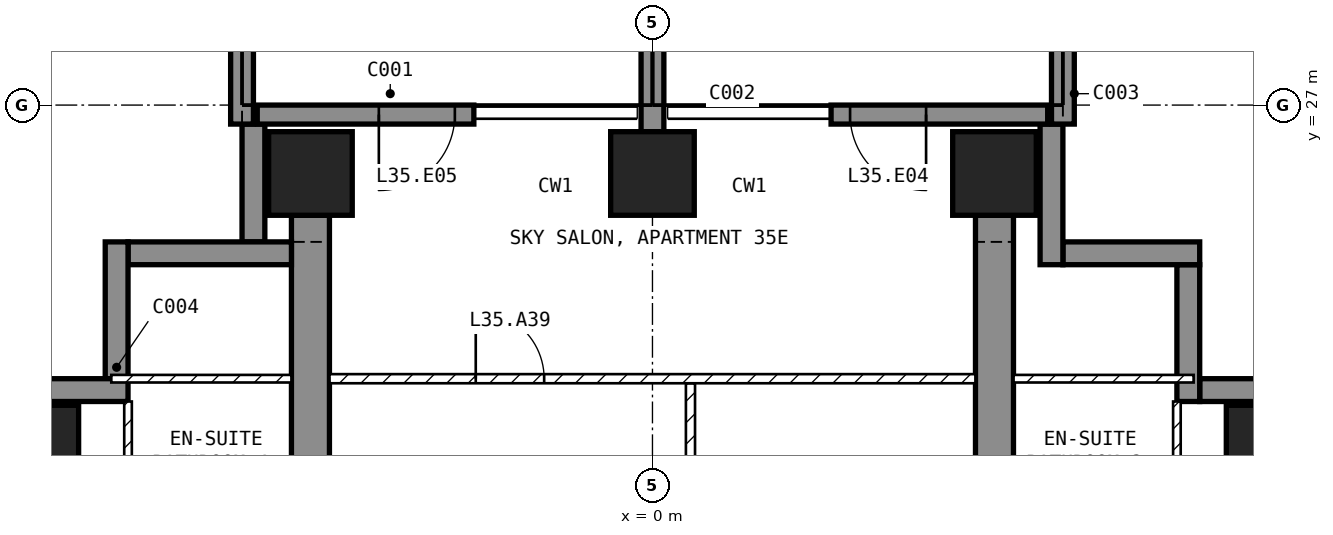
"""IFC4 building model, lengths in metres.
Left out: names, types, materials, properties, quantities, classifications, styles, units other than length and angle.
Written with IfcOpenShell. Run it as: python <this file> out.ifc"""

import sys

from ifc_helpers import new_model, si_unit, direction, frame, frame_2d, origin, origin_2d, place, context, subcontext, project, spatial, polyline, rectangle, outline, extrude, element, fill, save


model = new_model("IFC4")
c1 = context("Model", 3, precision=1e-05, world=origin(), true_north=direction((0.0, 1.0)))
c2 = subcontext(c1, "Body", "Model", "MODEL_VIEW")
j1 = project(units=[si_unit("LENGTHUNIT", "METRE"), si_unit("PLANEANGLEUNIT", "RADIAN")], contexts=[c1])
p1 = place(None, origin())
s1 = spatial("IfcSite", under=j1, at=p1, CompositionType="ELEMENT")
p2 = place(p1, origin())
s2 = spatial("IfcBuilding", under=s1, at=p2, CompositionType="ELEMENT")
p3 = place(p2, frame((0.0, 0.0, 144.4)))
s3 = spatial("IfcBuildingStorey", under=s2, at=p3, CompositionType="ELEMENT", Elevation=144.4)
for number, where, z_axis, x_axis in (
    (1, (-8.1, 22.5, -0.25), (0.0, 0.0, 1.0), (1.0, 0.0, 0.0)),
    (2, (-4.5, 26.1, -0.25), (0.0, 0.0, 1.0), (1.0, 0.0, 0.0)),
    (3, (0.0, 26.1, -0.25), (0.0, 0.0, 1.0), (1.0, 0.0, 0.0)),
    (4, (4.5, 26.1, -0.25), (0.0, 0.0, 1.0), (1.0, 0.0, 0.0)),
    (5, (8.1, 22.5, -0.25), (0.0, 0.0, 1.0), (1.0, 0.0, 0.0)),
):
    element("IfcColumn", number, at=place(p3, frame(where, z_axis=z_axis, x_axis=x_axis)), inside=s3, PredefinedType="COLUMN", context=c2, shape_type="SweptSolid", body=[
        extrude(rectangle(XDim=1.1, YDim=1.1, at=origin_2d()), origin(), (0.0, 0.0, 1.0), 3.5),
    ])
for number, where, z_axis, x_axis in (
    (6, (-4.75, 9.0, -0.25), (1.0, 0.0, 0.0), (0.0, 1.0, 0.0)),
    (7, (4.25, 9.0, -0.25), (1.0, 0.0, 0.0), (0.0, 1.0, 0.0)),
):
    element("IfcWall", number, at=place(p3, frame(where, z_axis=z_axis, x_axis=x_axis)), inside=s3, PredefinedType="SHEAR", context=c2, shape_type="SweptSolid", body=[
        extrude(outline(polyline([(0.0, 0.0), (2.1, 0.0), (2.1, 2.65), (4.5, 2.65), (4.5, 0.0), (9.9, 0.0), (9.9, 2.65), (12.3, 2.65), (12.3, 0.0), (16.55, 0.0), (16.55, 3.5), (0.0, 3.5), (0.0, 0.0)])), origin(), (0.0, 0.0, 1.0), 0.5),
    ])
p4 = place(p3, frame((5.2, 26.875, 0.0), z_axis=(0.0, 0.0, 1.0), x_axis=(-1.0, 0.0, 0.0)))
e8 = element("IfcWall", 8, at=p4, inside=s3, PredefinedType="SOLIDWALL", context=c2, shape_type="SweptSolid", body=[
    extrude(rectangle(XDim=2.85, YDim=0.25, at=frame_2d((1.425, 0.0))), origin(), (0.0, 0.0, 1.0), 3.25),
])
p5 = place(p4, frame((1.6, 0.0, 0.0)))
e9 = element("IfcOpeningElement", 9, at=p5, cuts=e8, PredefinedType="OPENING", context=c2, shape_type="SweptSolid", body=[
    extrude(rectangle(XDim=1.0, YDim=2.4, at=frame_2d((0.5, 1.2))), frame((0.0, 0.135, 0.0), z_axis=(0.0, -1.0, 0.0), x_axis=(1.0, 0.0, 0.0)), (0.0, 0.0, 1.0), 0.27),
])
p6 = place(p3, frame((-2.35, 26.875, 0.0), z_axis=(0.0, 0.0, 1.0), x_axis=(-1.0, 0.0, 0.0)))
e10 = element("IfcWall", 10, at=p6, inside=s3, PredefinedType="SOLIDWALL", context=c2, shape_type="SweptSolid", body=[
    extrude(rectangle(XDim=2.85, YDim=0.25, at=frame_2d((1.425, 0.0))), origin(), (0.0, 0.0, 1.0), 3.25),
])
p7 = place(p6, frame((0.25, 0.0, 0.0)))
e11 = element("IfcOpeningElement", 11, at=p7, cuts=e10, PredefinedType="OPENING", context=c2, shape_type="SweptSolid", body=[
    extrude(rectangle(XDim=1.0, YDim=2.4, at=frame_2d((0.5, 1.2))), frame((0.0, 0.135, 0.0), z_axis=(0.0, -1.0, 0.0), x_axis=(1.0, 0.0, 0.0)), (0.0, 0.0, 1.0), 0.27),
])
p8 = place(p3, frame((8.75, 23.25, 0.0), z_axis=(0.0, 0.0, 1.0), x_axis=(-1.0, 0.0, 0.0)))
e12 = element("IfcWall", 12, at=p8, inside=s3, PredefinedType="SOLIDWALL", context=c2, shape_type="SweptSolid", body=[
    extrude(rectangle(XDim=1.55, YDim=0.3, at=frame_2d((0.775, 0.0))), origin(), (0.0, 0.0, 1.0), 3.25),
])
p9 = place(p3, frame((7.05, 23.1, 0.0), z_axis=(0.0, 0.0, 1.0), x_axis=(0.0, 1.0, 0.0)))
e13 = element("IfcWall", 13, at=p9, inside=s3, PredefinedType="SOLIDWALL", context=c2, shape_type="SweptSolid", body=[
    extrude(rectangle(XDim=1.8, YDim=0.3, at=frame_2d((0.9, 0.0))), origin(), (0.0, 0.0, 1.0), 3.25),
])
p10 = place(p3, frame((7.2, 25.05, 0.0), z_axis=(0.0, 0.0, 1.0), x_axis=(-1.0, 0.0, 0.0)))
e14 = element("IfcWall", 14, at=p10, inside=s3, PredefinedType="SOLIDWALL", context=c2, shape_type="SweptSolid", body=[
    extrude(rectangle(XDim=1.8, YDim=0.3, at=frame_2d((0.9, 0.0))), origin(), (0.0, 0.0, 1.0), 3.25),
])
p11 = place(p3, frame((5.25, 24.9, 0.0), z_axis=(0.0, 0.0, 1.0), x_axis=(0.0, 1.0, 0.0)))
e15 = element("IfcWall", 15, at=p11, inside=s3, PredefinedType="SOLIDWALL", context=c2, shape_type="SweptSolid", body=[
    extrude(rectangle(XDim=1.85, YDim=0.3, at=frame_2d((0.925, 0.0))), origin(), (0.0, 0.0, 1.0), 3.25),
])
p12 = place(p3, frame((-5.25, 26.75, 0.0), z_axis=(0.0, 0.0, 1.0), x_axis=(0.0, -1.0, 0.0)))
e16 = element("IfcWall", 16, at=p12, inside=s3, PredefinedType="SOLIDWALL", context=c2, shape_type="SweptSolid", body=[
    extrude(rectangle(XDim=1.55, YDim=0.3, at=frame_2d((0.775, 0.0))), origin(), (0.0, 0.0, 1.0), 3.25),
])
p13 = place(p3, frame((-4.75, 25.05, 0.0), z_axis=(0.0, 0.0, 1.0), x_axis=(-1.0, 0.0, 0.0)))
e17 = element("IfcWall", 17, at=p13, inside=s3, PredefinedType="SOLIDWALL", context=c2, shape_type="SweptSolid", body=[
    extrude(rectangle(XDim=2.15, YDim=0.3, at=frame_2d((1.075, 0.0))), origin(), (0.0, 0.0, 1.0), 3.25),
])
p14 = place(p3, frame((-7.05, 25.2, 0.0), z_axis=(0.0, 0.0, 1.0), x_axis=(0.0, -1.0, 0.0)))
e18 = element("IfcWall", 18, at=p14, inside=s3, PredefinedType="SOLIDWALL", context=c2, shape_type="SweptSolid", body=[
    extrude(rectangle(XDim=1.8, YDim=0.3, at=frame_2d((0.9, 0.0))), origin(), (0.0, 0.0, 1.0), 3.25),
])
p15 = place(p3, frame((-6.9, 23.25, 0.0), z_axis=(0.0, 0.0, 1.0), x_axis=(-1.0, 0.0, 0.0)))
e19 = element("IfcWall", 19, at=p15, inside=s3, PredefinedType="SOLIDWALL", context=c2, shape_type="SweptSolid", body=[
    extrude(rectangle(XDim=1.85, YDim=0.3, at=frame_2d((0.925, 0.0))), origin(), (0.0, 0.0, 1.0), 3.25),
])
p16 = place(p3, frame((-5.4, 26.75, 0.0), z_axis=(0.0, 0.0, 1.0), x_axis=(0.0, 1.0, 0.0)))
e20 = element("IfcWall", 20, at=p16, inside=s3, PredefinedType="SOLIDWALL", context=c2, shape_type="SweptSolid", body=[
    extrude(rectangle(XDim=2.95, YDim=0.3, at=frame_2d((1.475, 0.0))), origin(), (0.0, 0.0, 1.0), 3.25),
])
p17 = place(p3, frame((0.0, 26.65, 0.0), z_axis=(0.0, 0.0, 1.0), x_axis=(0.0, 1.0, 0.0)))
e21 = element("IfcWall", 21, at=p17, inside=s3, PredefinedType="SOLIDWALL", context=c2, shape_type="SweptSolid", body=[
    extrude(rectangle(XDim=3.05, YDim=0.3, at=frame_2d((1.525, 0.0))), origin(), (0.0, 0.0, 1.0), 3.25),
])
p18 = place(p3, frame((5.4, 26.75, 0.0), z_axis=(0.0, 0.0, 1.0), x_axis=(0.0, 1.0, 0.0)))
e22 = element("IfcWall", 22, at=p18, inside=s3, PredefinedType="SOLIDWALL", context=c2, shape_type="SweptSolid", body=[
    extrude(rectangle(XDim=2.95, YDim=0.3, at=frame_2d((1.475, 0.0))), origin(), (0.0, 0.0, 1.0), 3.25),
])
p19 = place(p3, frame((0.5, 23.34, 0.0), z_axis=(0.0, 0.0, 1.0), x_axis=(0.0, -1.0, 0.0)))
e23 = element("IfcWall", 23, at=p19, inside=s3, PredefinedType="PARTITIONING", context=c2, shape_type="SweptSolid", body=[
    extrude(rectangle(XDim=4.38, YDim=0.12, at=frame_2d((2.19, 0.0))), origin(), (0.0, 0.0, 1.0), 3.25),
])
p20 = place(p19, frame((1.74, 0.0, 0.0)))
e24 = element("IfcOpeningElement", 24, at=p20, cuts=e23, PredefinedType="OPENING", context=c2, shape_type="SweptSolid", body=[
    extrude(rectangle(XDim=0.9, YDim=2.1, at=frame_2d((0.45, 1.05))), frame((0.0, 0.07, 0.0), z_axis=(0.0, -1.0, 0.0), x_axis=(1.0, 0.0, 0.0)), (0.0, 0.0, 1.0), 0.14),
])
p21 = place(p3, frame((-4.25, 23.4, 0.0), z_axis=(0.0, 0.0, 1.0), x_axis=(1.0, 0.0, 0.0)))
e25 = element("IfcWall", 25, at=p21, inside=s3, PredefinedType="PARTITIONING", context=c2, shape_type="SweptSolid", body=[
    extrude(rectangle(XDim=8.5, YDim=0.12, at=frame_2d((4.25, 0.0))), origin(), (0.0, 0.0, 1.0), 3.25),
])
p22 = place(p21, frame((1.925, 0.0, 0.0)))
e26 = element("IfcOpeningElement", 26, at=p22, cuts=e25, PredefinedType="OPENING", context=c2, shape_type="SweptSolid", body=[
    extrude(rectangle(XDim=0.9, YDim=2.1, at=frame_2d((0.45, 1.05))), frame((0.0, 0.07, 0.0), z_axis=(0.0, -1.0, 0.0), x_axis=(1.0, 0.0, 0.0)), (0.0, 0.0, 1.0), 0.14),
])
p23 = place(p3, frame((6.9, 20.45, 0.0), z_axis=(0.0, 0.0, 1.0), x_axis=(0.0, 1.0, 0.0)))
e27 = element("IfcWall", 27, at=p23, inside=s3, PredefinedType="PARTITIONING", context=c2, shape_type="SweptSolid", body=[
    extrude(rectangle(XDim=2.65, YDim=0.1, at=frame_2d((1.325, 0.0))), origin(), (0.0, 0.0, 1.0), 3.25),
])
p24 = place(p3, frame((4.75, 23.4, 0.0), z_axis=(0.0, 0.0, 1.0), x_axis=(1.0, 0.0, 0.0)))
e28 = element("IfcWall", 28, at=p24, inside=s3, PredefinedType="PARTITIONING", context=c2, shape_type="SweptSolid", body=[
    extrude(rectangle(XDim=2.37, YDim=0.1, at=frame_2d((1.185, 0.0))), origin(), (0.0, 0.0, 1.0), 3.25),
])
p25 = place(p3, frame((-6.9, 23.1, 0.0), z_axis=(0.0, 0.0, 1.0), x_axis=(0.0, -1.0, 0.0)))
e29 = element("IfcWall", 29, at=p25, inside=s3, PredefinedType="PARTITIONING", context=c2, shape_type="SweptSolid", body=[
    extrude(rectangle(XDim=2.65, YDim=0.1, at=frame_2d((1.325, 0.0))), origin(), (0.0, 0.0, 1.0), 3.25),
])
p26 = place(p3, frame((-7.12, 23.4, 0.0), z_axis=(0.0, 0.0, 1.0), x_axis=(1.0, 0.0, 0.0)))
e30 = element("IfcWall", 30, at=p26, inside=s3, PredefinedType="PARTITIONING", context=c2, shape_type="SweptSolid", body=[
    extrude(rectangle(XDim=2.37, YDim=0.1, at=frame_2d((1.185, 0.0))), origin(), (0.0, 0.0, 1.0), 3.25),
])
p27 = place(p5, origin())
e31 = element("IfcDoor", 31, at=p27, inside=s3, OperationType="SINGLE_SWING_LEFT", PredefinedType="DOOR", context=c2, shape_type="SweptSolid", body=[
    extrude(rectangle(XDim=1.0, YDim=2.4, at=frame_2d((0.5, 1.2))), frame((0.0, 0.025, 0.0), z_axis=(0.0, -1.0, 0.0), x_axis=(1.0, 0.0, 0.0)), (0.0, 0.0, 1.0), 0.05),
])
fill(e9, e31)
p28 = place(p7, origin())
e32 = element("IfcDoor", 32, at=p28, inside=s3, OperationType="SINGLE_SWING_RIGHT", PredefinedType="DOOR", context=c2, shape_type="SweptSolid", body=[
    extrude(rectangle(XDim=1.0, YDim=2.4, at=frame_2d((0.5, 1.2))), frame((0.0, 0.025, 0.0), z_axis=(0.0, -1.0, 0.0), x_axis=(1.0, 0.0, 0.0)), (0.0, 0.0, 1.0), 0.05),
])
fill(e11, e32)
p29 = place(p22, origin())
e33 = element("IfcDoor", 33, at=p29, inside=s3, OperationType="SINGLE_SWING_LEFT", PredefinedType="DOOR", context=c2, shape_type="SweptSolid", body=[
    extrude(rectangle(XDim=0.9, YDim=2.1, at=frame_2d((0.45, 1.05))), frame((0.0, 0.025, 0.0), z_axis=(0.0, -1.0, 0.0), x_axis=(1.0, 0.0, 0.0)), (0.0, 0.0, 1.0), 0.05),
])
fill(e26, e33)
save(model, sys.argv[1])
